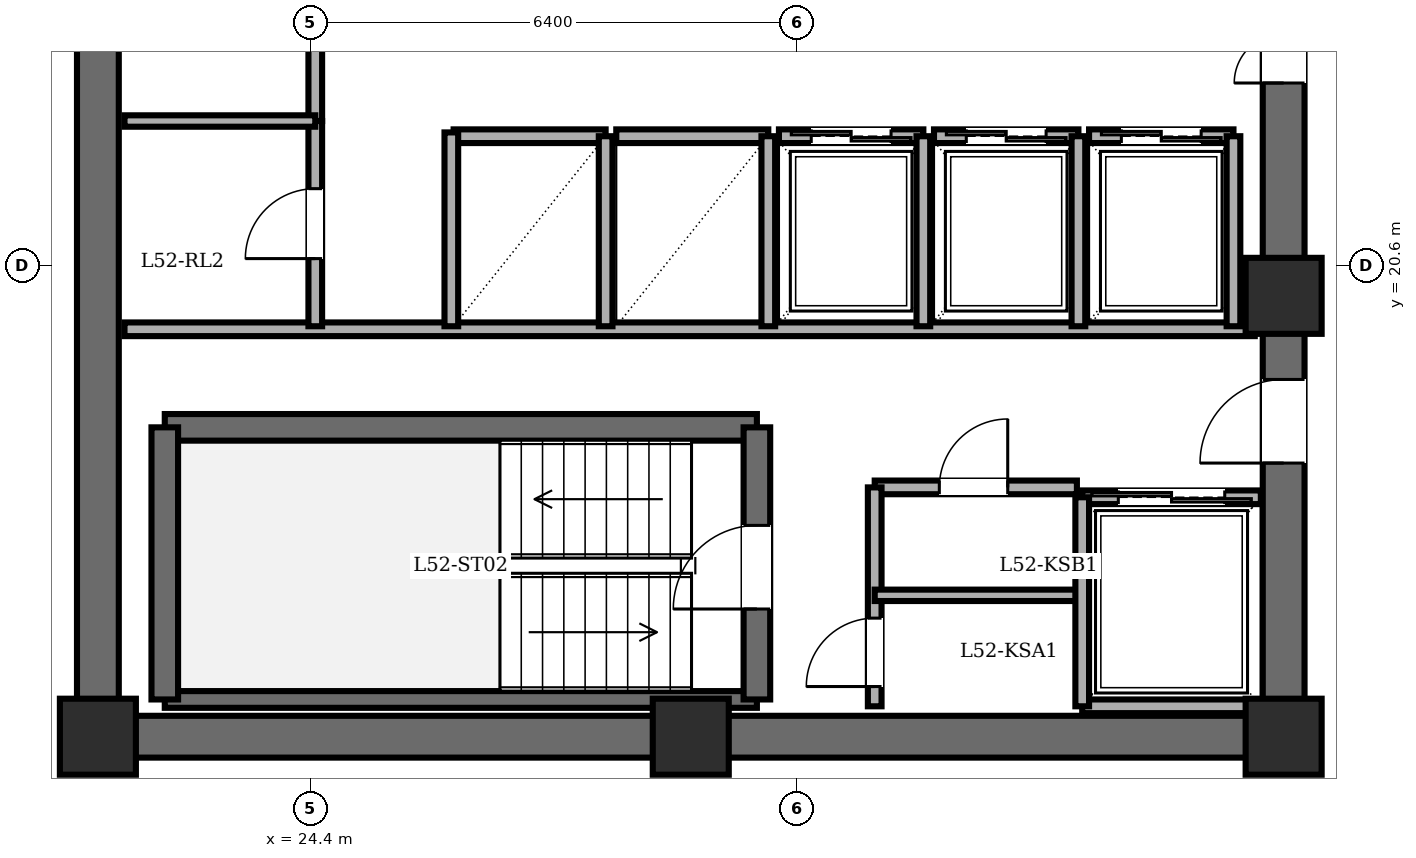
"""IFC4 building model, lengths in metres.
Left out: names, types, materials, properties, quantities, classifications, styles, units other than length and angle.
Written with IfcOpenShell. Run it as: python <this file> out.ifc"""

import sys

from ifc_helpers import new_model, si_unit, direction, frame, frame_2d, origin, origin_2d, place, context, subcontext, project, spatial, rectangle, extrude, element, fill, save


model = new_model("IFC4")
c1 = context("Model", 3, precision=1e-05, world=origin(), true_north=direction((0.0, 1.0)))
c2 = subcontext(c1, "Body", "Model", "MODEL_VIEW")
j1 = project(units=[si_unit("LENGTHUNIT", "METRE"), si_unit("PLANEANGLEUNIT", "RADIAN")], contexts=[c1])
p1 = place(None, origin())
s1 = spatial("IfcSite", under=j1, at=p1, CompositionType="ELEMENT")
p2 = place(p1, origin())
s2 = spatial("IfcBuilding", under=s1, at=p2, CompositionType="ELEMENT")
p3 = place(p2, frame((0.0, 0.0, 201.3)))
s3 = spatial("IfcBuildingStorey", under=s2, at=p3, CompositionType="ELEMENT", Elevation=201.3)
for number, where, z_axis, x_axis in (
    (1, (21.6, 14.4, 0.0), (0.0, 0.0, 1.0), (1.0, 0.0, 0.0)),
    (2, (29.4, 14.4, 0.0), (0.0, 0.0, 1.0), (1.0, 0.0, 0.0)),
    (3, (37.2, 14.4, 0.0), (0.0, 0.0, 1.0), (1.0, 0.0, 0.0)),
    (4, (37.2, 20.2, 0.0), (0.0, 0.0, 1.0), (1.0, 0.0, 0.0)),
):
    element("IfcColumn", number, at=place(p3, frame(where, z_axis=z_axis, x_axis=x_axis)), inside=s3, PredefinedType="COLUMN", context=c2, shape_type="SweptSolid", body=[
        extrude(rectangle(XDim=1.0, YDim=1.0, at=origin_2d()), origin(), (0.0, 0.0, 1.0), 3.6),
    ])
p4 = place(p3, frame((21.6, 14.4, 0.0), z_axis=(0.0, 0.0, 1.0), x_axis=(0.0, 1.0, 0.0)))
e5 = element("IfcWall", 5, at=p4, inside=s3, PredefinedType="SHEAR", context=c2, shape_type="SweptSolid", body=[
    extrude(rectangle(XDim=19.2, YDim=0.55, at=frame_2d((9.6, 0.0))), origin(), (0.0, 0.0, 1.0), 3.4),
])
p5 = place(p3, frame((37.2, 14.4, 0.0), z_axis=(0.0, 0.0, 1.0), x_axis=(-1.0, 0.0, 0.0)))
e6 = element("IfcWall", 6, at=p5, inside=s3, PredefinedType="SHEAR", context=c2, shape_type="SweptSolid", body=[
    extrude(rectangle(XDim=15.6, YDim=0.55, at=frame_2d((7.8, 0.0))), origin(), (0.0, 0.0, 1.0), 3.4),
])
p6 = place(p3, frame((37.2, 14.4, 0.0), z_axis=(0.0, 0.0, 1.0), x_axis=(0.0, 1.0, 0.0)))
e7 = element("IfcWall", 7, at=p6, inside=s3, PredefinedType="SHEAR", context=c2, shape_type="SweptSolid", body=[
    extrude(rectangle(XDim=19.2, YDim=0.55, at=frame_2d((9.6, 0.0))), origin(), (0.0, 0.0, 1.0), 3.4),
])
p7 = place(p6, frame((15.8, 0.0, 0.0)))
e8 = element("IfcOpeningElement", 8, at=p7, cuts=e7, PredefinedType="OPENING", context=c2, shape_type="SweptSolid", body=[
    extrude(rectangle(XDim=1.15, YDim=2.15, at=frame_2d((0.575, 1.075))), frame((0.0, 0.285, 0.0), z_axis=(0.0, -1.0, 0.0), x_axis=(1.0, 0.0, 0.0)), (0.0, 0.0, 1.0), 0.57),
])
p8 = place(p6, frame((3.6, 0.0, 0.0)))
e9 = element("IfcOpeningElement", 9, at=p8, cuts=e7, PredefinedType="OPENING", context=c2, shape_type="SweptSolid", body=[
    extrude(rectangle(XDim=1.1, YDim=2.15, at=frame_2d((0.55, 1.075))), frame((0.0, 0.285, 0.0), z_axis=(0.0, -1.0, 0.0), x_axis=(1.0, 0.0, 0.0)), (0.0, 0.0, 1.0), 0.57),
])
p9 = place(p6, frame((8.6, 0.0, 0.0)))
e10 = element("IfcOpeningElement", 10, at=p9, cuts=e7, PredefinedType="OPENING", context=c2, shape_type="SweptSolid", body=[
    extrude(rectangle(XDim=1.3, YDim=2.2, at=frame_2d((0.65, 1.1))), frame((0.0, 0.285, 0.0), z_axis=(0.0, -1.0, 0.0), x_axis=(1.0, 0.0, 0.0)), (0.0, 0.0, 1.0), 0.57),
])
p10 = place(p3, frame((22.48, 18.47, 0.0), z_axis=(0.0, 0.0, 1.0), x_axis=(1.0, 0.0, 0.0)))
e11 = element("IfcWall", 11, at=p10, inside=s3, PredefinedType="SOLIDWALL", context=c2, shape_type="SweptSolid", body=[
    extrude(rectangle(XDim=7.79, YDim=0.35, at=frame_2d((3.895, 0.0))), origin(), (0.0, 0.0, 1.0), 3.4),
])
p11 = place(p3, frame((22.48, 14.89, 0.0), z_axis=(0.0, 0.0, 1.0), x_axis=(1.0, 0.0, 0.0)))
e12 = element("IfcWall", 12, at=p11, inside=s3, PredefinedType="PARTITIONING", context=c2, shape_type="SweptSolid", body=[
    extrude(rectangle(XDim=7.79, YDim=0.22, at=frame_2d((3.895, 0.0))), origin(), (0.0, 0.0, 1.0), 3.4),
])
p12 = place(p3, frame((22.48, 14.89, 0.0), z_axis=(0.0, 0.0, 1.0), x_axis=(0.0, 1.0, 0.0)))
e13 = element("IfcWall", 13, at=p12, inside=s3, PredefinedType="SOLIDWALL", context=c2, shape_type="SweptSolid", body=[
    extrude(rectangle(XDim=3.58, YDim=0.35, at=frame_2d((1.79, 0.0))), origin(), (0.0, 0.0, 1.0), 3.4),
])
p13 = place(p3, frame((30.27, 14.89, 0.0), z_axis=(0.0, 0.0, 1.0), x_axis=(0.0, 1.0, 0.0)))
e14 = element("IfcWall", 14, at=p13, inside=s3, PredefinedType="SOLIDWALL", context=c2, shape_type="SweptSolid", body=[
    extrude(rectangle(XDim=3.58, YDim=0.35, at=frame_2d((1.79, 0.0))), origin(), (0.0, 0.0, 1.0), 3.4),
])
p14 = place(p13, frame((1.19, 0.0, 0.0)))
e15 = element("IfcOpeningElement", 15, at=p14, cuts=e14, PredefinedType="OPENING", context=c2, shape_type="SweptSolid", body=[
    extrude(rectangle(XDim=1.1, YDim=2.15, at=frame_2d((0.55, 1.075))), frame((0.0, 0.185, 0.0), z_axis=(0.0, -1.0, 0.0), x_axis=(1.0, 0.0, 0.0)), (0.0, 0.0, 1.0), 0.37),
])
p15 = place(p3, frame((21.95, 19.76, 0.0), z_axis=(0.0, 0.0, 1.0), x_axis=(1.0, 0.0, 0.0)))
e16 = element("IfcWall", 16, at=p15, inside=s3, PredefinedType="PARTITIONING", context=c2, shape_type="SweptSolid", body=[
    extrude(rectangle(XDim=14.87, YDim=0.18, at=frame_2d((7.435, 0.0))), origin(), (0.0, 0.0, 1.0), 3.4),
])
p16 = place(p3, frame((31.82, 17.68, 0.0), z_axis=(0.0, 0.0, 1.0), x_axis=(1.0, 0.0, 0.0)))
e17 = element("IfcWall", 17, at=p16, inside=s3, PredefinedType="PARTITIONING", context=c2, shape_type="SweptSolid", body=[
    extrude(rectangle(XDim=2.66, YDim=0.18, at=frame_2d((1.33, 0.0))), origin(), (0.0, 0.0, 1.0), 3.4),
])
p17 = place(p16, frame((0.85, 0.0, 0.0)))
e18 = element("IfcOpeningElement", 18, at=p17, cuts=e17, PredefinedType="OPENING", context=c2, shape_type="SweptSolid", body=[
    extrude(rectangle(XDim=0.9, YDim=2.05, at=frame_2d((0.45, 1.025))), frame((0.0, 0.1, 0.0), z_axis=(0.0, -1.0, 0.0), x_axis=(1.0, 0.0, 0.0)), (0.0, 0.0, 1.0), 0.2),
])
p18 = place(p3, frame((31.82, 14.8, 0.0), z_axis=(0.0, 0.0, 1.0), x_axis=(0.0, 1.0, 0.0)))
e19 = element("IfcWall", 19, at=p18, inside=s3, PredefinedType="PARTITIONING", context=c2, shape_type="SweptSolid", body=[
    extrude(rectangle(XDim=2.88, YDim=0.18, at=frame_2d((1.44, 0.0))), origin(), (0.0, 0.0, 1.0), 3.4),
])
p19 = place(p18, frame((0.26, 0.0, 0.0)))
e20 = element("IfcOpeningElement", 20, at=p19, cuts=e19, PredefinedType="OPENING", context=c2, shape_type="SweptSolid", body=[
    extrude(rectangle(XDim=0.9, YDim=2.05, at=frame_2d((0.45, 1.025))), frame((0.0, 0.1, 0.0), z_axis=(0.0, -1.0, 0.0), x_axis=(1.0, 0.0, 0.0)), (0.0, 0.0, 1.0), 0.2),
])
p20 = place(p3, frame((31.82, 16.26, 0.0), z_axis=(0.0, 0.0, 1.0), x_axis=(1.0, 0.0, 0.0)))
e21 = element("IfcWall", 21, at=p20, inside=s3, PredefinedType="PARTITIONING", context=c2, shape_type="SweptSolid", body=[
    extrude(rectangle(XDim=2.66, YDim=0.15, at=frame_2d((1.33, 0.0))), origin(), (0.0, 0.0, 1.0), 3.4),
])
p21 = place(p3, frame((34.55, 17.55, 0.0), z_axis=(0.0, 0.0, 1.0), x_axis=(1.0, 0.0, 0.0)))
e22 = element("IfcWall", 22, at=p21, inside=s3, PredefinedType="PARTITIONING", context=c2, shape_type="SweptSolid", body=[
    extrude(rectangle(XDim=2.35, YDim=0.18, at=frame_2d((1.175, 0.0))), origin(), (0.0, 0.0, 1.0), 3.4),
])
p22 = place(p21, frame((0.475, 0.0, 0.0)))
e23 = element("IfcOpeningElement", 23, at=p22, cuts=e22, PredefinedType="OPENING", context=c2, shape_type="SweptSolid", body=[
    extrude(rectangle(XDim=1.4, YDim=2.3, at=frame_2d((0.7, 1.15))), frame((0.0, 0.1, 0.0), z_axis=(0.0, -1.0, 0.0), x_axis=(1.0, 0.0, 0.0)), (0.0, 0.0, 1.0), 0.2),
])
p23 = place(p3, frame((36.9, 14.8, 0.0), z_axis=(0.0, 0.0, 1.0), x_axis=(-1.0, 0.0, 0.0)))
e24 = element("IfcWall", 24, at=p23, inside=s3, PredefinedType="PARTITIONING", context=c2, shape_type="SweptSolid", body=[
    extrude(rectangle(XDim=2.35, YDim=0.18, at=frame_2d((1.175, 0.0))), origin(), (0.0, 0.0, 1.0), 3.4),
])
p24 = place(p3, frame((34.55, 17.55, 0.0), z_axis=(0.0, 0.0, 1.0), x_axis=(0.0, -1.0, 0.0)))
e25 = element("IfcWall", 25, at=p24, inside=s3, PredefinedType="PARTITIONING", context=c2, shape_type="SweptSolid", body=[
    extrude(rectangle(XDim=2.75, YDim=0.18, at=frame_2d((1.375, 0.0))), origin(), (0.0, 0.0, 1.0), 3.4),
])
p25 = place(p3, frame((26.28, 22.3, 0.0), z_axis=(0.0, 0.0, 1.0), x_axis=(1.0, 0.0, 0.0)))
e26 = element("IfcWall", 26, at=p25, inside=s3, PredefinedType="PARTITIONING", context=c2, shape_type="SweptSolid", body=[
    extrude(rectangle(XDim=2.0, YDim=0.18, at=frame_2d((1.0, 0.0))), origin(), (0.0, 0.0, 1.0), 3.4),
])
p26 = place(p3, frame((28.28, 19.8, 0.0), z_axis=(0.0, 0.0, 1.0), x_axis=(0.0, 1.0, 0.0)))
e27 = element("IfcWall", 27, at=p26, inside=s3, PredefinedType="PARTITIONING", context=c2, shape_type="SweptSolid", body=[
    extrude(rectangle(XDim=2.5, YDim=0.18, at=frame_2d((1.25, 0.0))), origin(), (0.0, 0.0, 1.0), 3.4),
])
p27 = place(p3, frame((28.42, 22.3, 0.0), z_axis=(0.0, 0.0, 1.0), x_axis=(1.0, 0.0, 0.0)))
e28 = element("IfcWall", 28, at=p27, inside=s3, PredefinedType="PARTITIONING", context=c2, shape_type="SweptSolid", body=[
    extrude(rectangle(XDim=2.0, YDim=0.18, at=frame_2d((1.0, 0.0))), origin(), (0.0, 0.0, 1.0), 3.4),
])
p28 = place(p3, frame((30.42, 19.8, 0.0), z_axis=(0.0, 0.0, 1.0), x_axis=(0.0, 1.0, 0.0)))
e29 = element("IfcWall", 29, at=p28, inside=s3, PredefinedType="PARTITIONING", context=c2, shape_type="SweptSolid", body=[
    extrude(rectangle(XDim=2.5, YDim=0.18, at=frame_2d((1.25, 0.0))), origin(), (0.0, 0.0, 1.0), 3.4),
])
p29 = place(p3, frame((30.56, 22.3, 0.0), z_axis=(0.0, 0.0, 1.0), x_axis=(1.0, 0.0, 0.0)))
e30 = element("IfcWall", 30, at=p29, inside=s3, PredefinedType="PARTITIONING", context=c2, shape_type="SweptSolid", body=[
    extrude(rectangle(XDim=1.9, YDim=0.18, at=frame_2d((0.95, 0.0))), origin(), (0.0, 0.0, 1.0), 3.4),
])
p30 = place(p29, frame((0.425, 0.0, 0.0)))
e31 = element("IfcOpeningElement", 31, at=p30, cuts=e30, PredefinedType="OPENING", context=c2, shape_type="SweptSolid", body=[
    extrude(rectangle(XDim=1.05, YDim=2.2, at=frame_2d((0.525, 1.1))), frame((0.0, 0.1, 0.0), z_axis=(0.0, -1.0, 0.0), x_axis=(1.0, 0.0, 0.0)), (0.0, 0.0, 1.0), 0.2),
])
p31 = place(p3, frame((32.46, 19.8, 0.0), z_axis=(0.0, 0.0, 1.0), x_axis=(0.0, 1.0, 0.0)))
e32 = element("IfcWall", 32, at=p31, inside=s3, PredefinedType="PARTITIONING", context=c2, shape_type="SweptSolid", body=[
    extrude(rectangle(XDim=2.5, YDim=0.18, at=frame_2d((1.25, 0.0))), origin(), (0.0, 0.0, 1.0), 3.4),
])
p32 = place(p3, frame((32.6, 22.3, 0.0), z_axis=(0.0, 0.0, 1.0), x_axis=(1.0, 0.0, 0.0)))
e33 = element("IfcWall", 33, at=p32, inside=s3, PredefinedType="PARTITIONING", context=c2, shape_type="SweptSolid", body=[
    extrude(rectangle(XDim=1.9, YDim=0.18, at=frame_2d((0.95, 0.0))), origin(), (0.0, 0.0, 1.0), 3.4),
])
p33 = place(p32, frame((0.425, 0.0, 0.0)))
e34 = element("IfcOpeningElement", 34, at=p33, cuts=e33, PredefinedType="OPENING", context=c2, shape_type="SweptSolid", body=[
    extrude(rectangle(XDim=1.05, YDim=2.2, at=frame_2d((0.525, 1.1))), frame((0.0, 0.1, 0.0), z_axis=(0.0, -1.0, 0.0), x_axis=(1.0, 0.0, 0.0)), (0.0, 0.0, 1.0), 0.2),
])
p34 = place(p3, frame((34.5, 19.8, 0.0), z_axis=(0.0, 0.0, 1.0), x_axis=(0.0, 1.0, 0.0)))
e35 = element("IfcWall", 35, at=p34, inside=s3, PredefinedType="PARTITIONING", context=c2, shape_type="SweptSolid", body=[
    extrude(rectangle(XDim=2.5, YDim=0.18, at=frame_2d((1.25, 0.0))), origin(), (0.0, 0.0, 1.0), 3.4),
])
p35 = place(p3, frame((34.64, 22.3, 0.0), z_axis=(0.0, 0.0, 1.0), x_axis=(1.0, 0.0, 0.0)))
e36 = element("IfcWall", 36, at=p35, inside=s3, PredefinedType="PARTITIONING", context=c2, shape_type="SweptSolid", body=[
    extrude(rectangle(XDim=1.9, YDim=0.18, at=frame_2d((0.95, 0.0))), origin(), (0.0, 0.0, 1.0), 3.4),
])
p36 = place(p35, frame((0.425, 0.0, 0.0)))
e37 = element("IfcOpeningElement", 37, at=p36, cuts=e36, PredefinedType="OPENING", context=c2, shape_type="SweptSolid", body=[
    extrude(rectangle(XDim=1.05, YDim=2.2, at=frame_2d((0.525, 1.1))), frame((0.0, 0.1, 0.0), z_axis=(0.0, -1.0, 0.0), x_axis=(1.0, 0.0, 0.0)), (0.0, 0.0, 1.0), 0.2),
])
p37 = place(p3, frame((36.54, 19.8, 0.0), z_axis=(0.0, 0.0, 1.0), x_axis=(0.0, 1.0, 0.0)))
e38 = element("IfcWall", 38, at=p37, inside=s3, PredefinedType="PARTITIONING", context=c2, shape_type="SweptSolid", body=[
    extrude(rectangle(XDim=2.5, YDim=0.18, at=frame_2d((1.25, 0.0))), origin(), (0.0, 0.0, 1.0), 3.4),
])
p38 = place(p3, frame((24.46, 22.5, 0.0), z_axis=(0.0, 0.0, 1.0), x_axis=(0.0, 1.0, 0.0)))
e39 = element("IfcWall", 39, at=p38, inside=s3, PredefinedType="PARTITIONING", context=c2, shape_type="SweptSolid", body=[
    extrude(rectangle(XDim=5.0, YDim=0.18, at=frame_2d((2.5, 0.0))), origin(), (0.0, 0.0, 1.0), 3.4),
])
p39 = place(p38, frame((2.04, 0.0, 0.0)))
e40 = element("IfcOpeningElement", 40, at=p39, cuts=e39, PredefinedType="OPENING", context=c2, shape_type="SweptSolid", body=[
    extrude(rectangle(XDim=0.92, YDim=2.1, at=frame_2d((0.46, 1.05))), frame((0.0, 0.1, 0.0), z_axis=(0.0, -1.0, 0.0), x_axis=(1.0, 0.0, 0.0)), (0.0, 0.0, 1.0), 0.2),
])
p40 = place(p3, frame((24.46, 19.8, 0.0), z_axis=(0.0, 0.0, 1.0), x_axis=(0.0, 1.0, 0.0)))
e41 = element("IfcWall", 41, at=p40, inside=s3, PredefinedType="PARTITIONING", context=c2, shape_type="SweptSolid", body=[
    extrude(rectangle(XDim=2.7, YDim=0.18, at=frame_2d((1.35, 0.0))), origin(), (0.0, 0.0, 1.0), 3.4),
])
p41 = place(p40, frame((0.89, 0.0, 0.0)))
e42 = element("IfcOpeningElement", 42, at=p41, cuts=e41, PredefinedType="OPENING", context=c2, shape_type="SweptSolid", body=[
    extrude(rectangle(XDim=0.92, YDim=2.1, at=frame_2d((0.46, 1.05))), frame((0.0, 0.1, 0.0), z_axis=(0.0, -1.0, 0.0), x_axis=(1.0, 0.0, 0.0)), (0.0, 0.0, 1.0), 0.2),
])
p42 = place(p3, frame((21.95, 22.5, 0.0), z_axis=(0.0, 0.0, 1.0), x_axis=(1.0, 0.0, 0.0)))
e43 = element("IfcWall", 43, at=p42, inside=s3, PredefinedType="PARTITIONING", context=c2, shape_type="SweptSolid", body=[
    extrude(rectangle(XDim=2.51, YDim=0.15, at=frame_2d((1.255, 0.0))), origin(), (0.0, 0.0, 1.0), 3.4),
])
p43 = place(p3, frame((26.25, 19.8, 0.0), z_axis=(0.0, 0.0, 1.0), x_axis=(0.0, 1.0, 0.0)))
e44 = element("IfcWall", 44, at=p43, inside=s3, PredefinedType="PARTITIONING", context=c2, shape_type="SweptSolid", body=[
    extrude(rectangle(XDim=2.55, YDim=0.18, at=frame_2d((1.275, 0.0))), origin(), (0.0, 0.0, 1.0), 3.4),
])
p44 = place(p14, origin())
e45 = element("IfcDoor", 45, at=p44, inside=s3, OperationType="SINGLE_SWING_LEFT", PredefinedType="DOOR", context=c2, shape_type="SweptSolid", body=[
    extrude(rectangle(XDim=1.1, YDim=2.15, at=frame_2d((0.55, 1.075))), frame((0.0, 0.025, 0.0), z_axis=(0.0, -1.0, 0.0), x_axis=(1.0, 0.0, 0.0)), (0.0, 0.0, 1.0), 0.05),
])
fill(e15, e45)
p45 = place(p8, origin())
e46 = element("IfcDoor", 46, at=p45, inside=s3, OperationType="SINGLE_SWING_LEFT", PredefinedType="DOOR", context=c2, shape_type="SweptSolid", body=[
    extrude(rectangle(XDim=1.1, YDim=2.15, at=frame_2d((0.55, 1.075))), frame((0.0, 0.025, 0.0), z_axis=(0.0, -1.0, 0.0), x_axis=(1.0, 0.0, 0.0)), (0.0, 0.0, 1.0), 0.05),
])
fill(e9, e46)
p46 = place(p17, origin())
e47 = element("IfcDoor", 47, at=p46, inside=s3, OperationType="SINGLE_SWING_RIGHT", PredefinedType="DOOR", context=c2, shape_type="SweptSolid", body=[
    extrude(rectangle(XDim=0.9, YDim=2.05, at=frame_2d((0.45, 1.025))), frame((0.0, 0.025, 0.0), z_axis=(0.0, -1.0, 0.0), x_axis=(1.0, 0.0, 0.0)), (0.0, 0.0, 1.0), 0.05),
])
fill(e18, e47)
p47 = place(p19, origin())
e48 = element("IfcDoor", 48, at=p47, inside=s3, OperationType="SINGLE_SWING_LEFT", PredefinedType="DOOR", context=c2, shape_type="SweptSolid", body=[
    extrude(rectangle(XDim=0.9, YDim=2.05, at=frame_2d((0.45, 1.025))), frame((0.0, 0.025, 0.0), z_axis=(0.0, -1.0, 0.0), x_axis=(1.0, 0.0, 0.0)), (0.0, 0.0, 1.0), 0.05),
])
fill(e20, e48)
p48 = place(p22, origin())
e49 = element("IfcDoor", 49, at=p48, inside=s3, OperationType="DOUBLE_DOOR_SLIDING", PredefinedType="DOOR", context=c2, shape_type="SweptSolid", body=[
    extrude(rectangle(XDim=1.4, YDim=2.3, at=frame_2d((0.7, 1.15))), frame((0.0, 0.025, 0.0), z_axis=(0.0, -1.0, 0.0), x_axis=(1.0, 0.0, 0.0)), (0.0, 0.0, 1.0), 0.05),
])
fill(e23, e49)
p49 = place(p30, origin())
e50 = element("IfcDoor", 50, at=p49, inside=s3, OperationType="DOUBLE_DOOR_SLIDING", PredefinedType="DOOR", context=c2, shape_type="SweptSolid", body=[
    extrude(rectangle(XDim=1.05, YDim=2.2, at=frame_2d((0.525, 1.1))), frame((0.0, 0.025, 0.0), z_axis=(0.0, -1.0, 0.0), x_axis=(1.0, 0.0, 0.0)), (0.0, 0.0, 1.0), 0.05),
])
fill(e31, e50)
p50 = place(p33, origin())
e51 = element("IfcDoor", 51, at=p50, inside=s3, OperationType="DOUBLE_DOOR_SLIDING", PredefinedType="DOOR", context=c2, shape_type="SweptSolid", body=[
    extrude(rectangle(XDim=1.05, YDim=2.2, at=frame_2d((0.525, 1.1))), frame((0.0, 0.025, 0.0), z_axis=(0.0, -1.0, 0.0), x_axis=(1.0, 0.0, 0.0)), (0.0, 0.0, 1.0), 0.05),
])
fill(e34, e51)
p51 = place(p36, origin())
e52 = element("IfcDoor", 52, at=p51, inside=s3, OperationType="DOUBLE_DOOR_SLIDING", PredefinedType="DOOR", context=c2, shape_type="SweptSolid", body=[
    extrude(rectangle(XDim=1.05, YDim=2.2, at=frame_2d((0.525, 1.1))), frame((0.0, 0.025, 0.0), z_axis=(0.0, -1.0, 0.0), x_axis=(1.0, 0.0, 0.0)), (0.0, 0.0, 1.0), 0.05),
])
fill(e37, e52)
p52 = place(p41, origin())
e53 = element("IfcDoor", 53, at=p52, inside=s3, OperationType="SINGLE_SWING_LEFT", PredefinedType="DOOR", context=c2, shape_type="SweptSolid", body=[
    extrude(rectangle(XDim=0.92, YDim=2.1, at=frame_2d((0.46, 1.05))), frame((0.0, 0.025, 0.0), z_axis=(0.0, -1.0, 0.0), x_axis=(1.0, 0.0, 0.0)), (0.0, 0.0, 1.0), 0.05),
])
fill(e42, e53)
p53 = place(p9, origin())
e54 = element("IfcDoor", 54, at=p53, inside=s3, OperationType="DOUBLE_DOOR_SINGLE_SWING", PredefinedType="DOOR", context=c2, shape_type="SweptSolid", body=[
    extrude(rectangle(XDim=1.3, YDim=2.2, at=frame_2d((0.65, 1.1))), frame((0.0, 0.025, 0.0), z_axis=(0.0, -1.0, 0.0), x_axis=(1.0, 0.0, 0.0)), (0.0, 0.0, 1.0), 0.05),
])
fill(e10, e54)
save(model, sys.argv[1])
